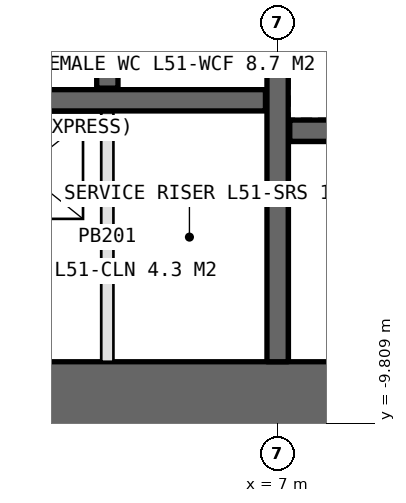
"""IFC4 building model, lengths in metres.
Left out: names, types, materials, properties, quantities, classifications, styles, units other than length and angle.
Written with IfcOpenShell. Run it as: python <this file> out.ifc"""

import sys

from ifc_helpers import new_model, si_unit, direction, frame, frame_2d, origin, place, context, subcontext, project, spatial, rectangle, extrude, element, save


model = new_model("IFC4")
c1 = context("Model", 3, precision=1e-05, world=origin(), true_north=direction((0.0, 1.0)))
c2 = subcontext(c1, "Body", "Model", "MODEL_VIEW")
j1 = project(units=[si_unit("LENGTHUNIT", "METRE"), si_unit("PLANEANGLEUNIT", "RADIAN")], contexts=[c1])
p1 = place(None, origin())
s1 = spatial("IfcSite", under=j1, at=p1, CompositionType="ELEMENT")
p2 = place(p1, origin())
s2 = spatial("IfcBuilding", under=s1, at=p2, CompositionType="ELEMENT")
p3 = place(p2, frame((0.0, 0.0, 232.6)))
s3 = spatial("IfcBuildingStorey", under=s2, at=p3, CompositionType="ELEMENT", Elevation=232.6)
p4 = place(p3, frame((-14.0, -9.4, 0.0), z_axis=(0.0, 0.0, 1.0), x_axis=(1.0, 0.0, 0.0)))
e1 = element("IfcWall", 1, at=p4, inside=s3, PredefinedType="SHEAR", context=c2, shape_type="SweptSolid", body=[
    extrude(rectangle(XDim=28.0, YDim=1.2, at=frame_2d((14.0, 0.0))), origin(), (0.0, 0.0, 1.0), 4.2),
])
p5 = place(p4, frame((22.9, 0.0, 0.0)))
e2 = element("IfcOpeningElement", 2, at=p5, cuts=e1, PredefinedType="OPENING", context=c2, shape_type="SweptSolid", body=[
    extrude(rectangle(XDim=2.2, YDim=2.7, at=frame_2d((1.1, 1.35))), frame((0.0, 0.61, 0.0), z_axis=(0.0, -1.0, 0.0), x_axis=(1.0, 0.0, 0.0)), (0.0, 0.0, 1.0), 1.22),
])
p6 = place(p3, frame((7.0, -8.8, 0.0), z_axis=(0.0, 0.0, 1.0), x_axis=(0.0, 1.0, 0.0)))
e3 = element("IfcWall", 3, at=p6, inside=s3, PredefinedType="SHEAR", context=c2, shape_type="SweptSolid", body=[
    extrude(rectangle(XDim=17.6, YDim=0.35, at=frame_2d((8.8, 0.0))), origin(), (0.0, 0.0, 1.0), 4.2),
])
p7 = place(p6, frame((7.9, 0.0, 0.0)))
e4 = element("IfcOpeningElement", 4, at=p7, cuts=e3, PredefinedType="OPENING", context=c2, shape_type="SweptSolid", body=[
    extrude(rectangle(XDim=1.8, YDim=2.4, at=frame_2d((0.9, 1.2))), frame((0.0, 0.185, 0.0), z_axis=(0.0, -1.0, 0.0), x_axis=(1.0, 0.0, 0.0)), (0.0, 0.0, 1.0), 0.37),
])
p8 = place(p3, frame((-6.8, -4.5, 0.0), z_axis=(0.0, 0.0, 1.0), x_axis=(1.0, 0.0, 0.0)))
e5 = element("IfcWall", 5, at=p8, inside=s3, PredefinedType="SHEAR", context=c2, shape_type="SweptSolid", body=[
    extrude(rectangle(XDim=13.6, YDim=0.35, at=frame_2d((6.8, 0.0))), origin(), (0.0, 0.0, 1.0), 4.2),
])
p9 = place(p3, frame((7.2, -5.0, 0.0), z_axis=(0.0, 0.0, 1.0), x_axis=(1.0, 0.0, 0.0)))
e6 = element("IfcWall", 6, at=p9, inside=s3, PredefinedType="SHEAR", context=c2, shape_type="SweptSolid", body=[
    extrude(rectangle(XDim=5.6, YDim=0.35, at=frame_2d((2.8, 0.0))), origin(), (0.0, 0.0, 1.0), 4.2),
])
p10 = place(p3, frame((4.2, -4.3, 0.0), z_axis=(0.0, 0.0, 1.0), x_axis=(0.0, 1.0, 0.0)))
e7 = element("IfcWall", 7, at=p10, inside=s3, PredefinedType="SHEAR", context=c2, shape_type="SweptSolid", body=[
    extrude(rectangle(XDim=2.5, YDim=0.35, at=frame_2d((1.25, 0.0))), origin(), (0.0, 0.0, 1.0), 4.2),
])
p11 = place(p3, frame((4.2, -4.7, 0.0), z_axis=(0.0, 0.0, 1.0), x_axis=(0.0, -1.0, 0.0)))
e8 = element("IfcWall", 8, at=p11, inside=s3, PredefinedType="PARTITIONING", context=c2, shape_type="SweptSolid", body=[
    extrude(rectangle(XDim=4.1, YDim=0.2, at=frame_2d((2.05, 0.0))), origin(), (0.0, 0.0, 1.0), 4.2),
])
save(model, sys.argv[1])
